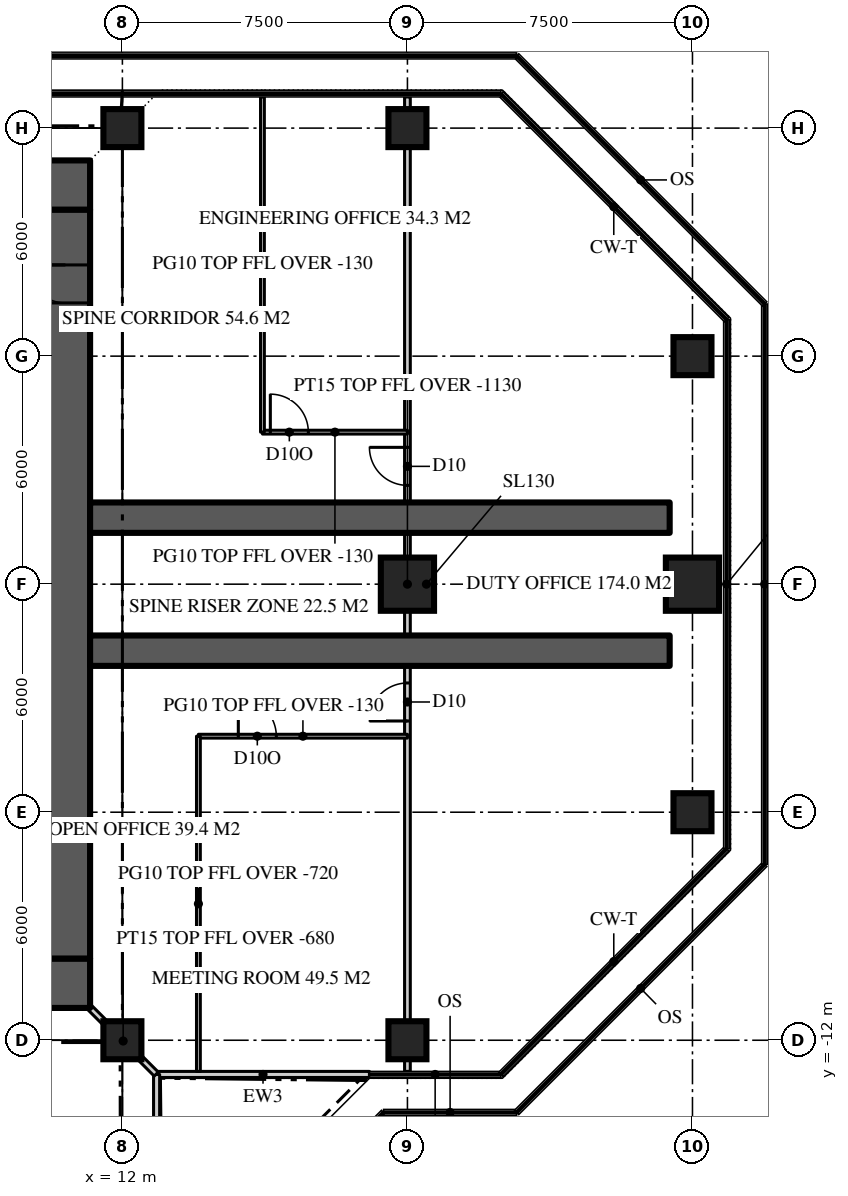
"""IFC4 building model, lengths in metres.
Left out: names, types, materials, properties, quantities, classifications, styles, units other than length and angle.
Written with IfcOpenShell. Run it as: python <this file> out.ifc"""

import sys

from ifc_helpers import new_model, si_unit, direction, frame, frame_2d, origin, origin_2d, place, context, subcontext, project, spatial, rectangle, extrude, element, fill, save


model = new_model("IFC4")
c1 = context("Model", 3, precision=1e-05, world=origin(), true_north=direction((0.0, 1.0)))
c2 = subcontext(c1, "Body", "Model", "MODEL_VIEW")
j1 = project(units=[si_unit("LENGTHUNIT", "METRE"), si_unit("PLANEANGLEUNIT", "RADIAN")], contexts=[c1])
p1 = place(None, origin())
s1 = spatial("IfcSite", under=j1, at=p1, CompositionType="ELEMENT")
p2 = place(p1, origin())
s2 = spatial("IfcBuilding", under=s1, at=p2, CompositionType="ELEMENT")
p3 = place(p2, frame((0.0, 0.0, 271.2)))
s3 = spatial("IfcBuildingStorey", under=s2, at=p3, CompositionType="ELEMENT", Elevation=271.2)
p4 = place(p3, frame((-11.15, 10.5, 0.0), z_axis=(0.0, 0.0, 1.0), x_axis=(1.0, 0.0, 0.0)))
e1 = element("IfcWall", 1, at=p4, inside=s3, PredefinedType="SHEAR", context=c2, shape_type="SweptSolid", body=[
    extrude(rectangle(XDim=22.3, YDim=1.3, at=frame_2d((11.15, 0.0))), origin(), (0.0, 0.0, 1.0), 3.9),
])
p5 = place(p4, frame((4.25, 0.0, 0.0)))
e2 = element("IfcOpeningElement", 2, at=p5, cuts=e1, PredefinedType="OPENING", context=c2, shape_type="SweptSolid", body=[
    extrude(rectangle(XDim=1.8, YDim=2.2, at=frame_2d((0.9, 1.1))), frame((0.0, 0.66, 0.0), z_axis=(0.0, -1.0, 0.0), x_axis=(1.0, 0.0, 0.0)), (0.0, 0.0, 1.0), 1.32),
])
p6 = place(p4, frame((16.25, 0.0, 0.0)))
e3 = element("IfcOpeningElement", 3, at=p6, cuts=e1, PredefinedType="OPENING", context=c2, shape_type="SweptSolid", body=[
    extrude(rectangle(XDim=1.8, YDim=2.2, at=frame_2d((0.9, 1.1))), frame((0.0, 0.66, 0.0), z_axis=(0.0, -1.0, 0.0), x_axis=(1.0, 0.0, 0.0)), (0.0, 0.0, 1.0), 1.32),
])
p7 = place(p3, frame((11.15, -10.5, 0.0), z_axis=(0.0, 0.0, 1.0), x_axis=(-1.0, 0.0, 0.0)))
e4 = element("IfcWall", 4, at=p7, inside=s3, PredefinedType="SHEAR", context=c2, shape_type="SweptSolid", body=[
    extrude(rectangle(XDim=22.3, YDim=1.3, at=frame_2d((11.15, 0.0))), origin(), (0.0, 0.0, 1.0), 3.9),
])
p8 = place(p7, frame((16.25, 0.0, 0.0)))
e5 = element("IfcOpeningElement", 5, at=p8, cuts=e4, PredefinedType="OPENING", context=c2, shape_type="SweptSolid", body=[
    extrude(rectangle(XDim=1.8, YDim=2.2, at=frame_2d((0.9, 1.1))), frame((0.0, 0.66, 0.0), z_axis=(0.0, -1.0, 0.0), x_axis=(1.0, 0.0, 0.0)), (0.0, 0.0, 1.0), 1.32),
])
p9 = place(p7, frame((4.25, 0.0, 0.0)))
e6 = element("IfcOpeningElement", 6, at=p9, cuts=e4, PredefinedType="OPENING", context=c2, shape_type="SweptSolid", body=[
    extrude(rectangle(XDim=1.8, YDim=2.2, at=frame_2d((0.9, 1.1))), frame((0.0, 0.66, 0.0), z_axis=(0.0, -1.0, 0.0), x_axis=(1.0, 0.0, 0.0)), (0.0, 0.0, 1.0), 1.32),
])
p10 = place(p3, frame((10.5, -9.85, 0.0), z_axis=(0.0, 0.0, 1.0), x_axis=(0.0, 1.0, 0.0)))
e7 = element("IfcWall", 7, at=p10, inside=s3, PredefinedType="SHEAR", context=c2, shape_type="SweptSolid", body=[
    extrude(rectangle(XDim=19.7, YDim=1.3, at=frame_2d((9.85, 0.0))), origin(), (0.0, 0.0, 1.0), 3.9),
])
p11 = place(p10, frame((17.25, 0.0, 0.0)))
e8 = element("IfcOpeningElement", 8, at=p11, cuts=e7, PredefinedType="OPENING", context=c2, shape_type="SweptSolid", body=[
    extrude(rectangle(XDim=1.0, YDim=2.2, at=frame_2d((0.5, 1.1))), frame((0.0, 0.66, 0.0), z_axis=(0.0, -1.0, 0.0), x_axis=(1.0, 0.0, 0.0)), (0.0, 0.0, 1.0), 1.32),
])
for number, where, z_axis, x_axis in (
    (9, (11.15, -1.75, 0.0), (0.0, 0.0, 1.0), (1.0, 0.0, 0.0)),
    (10, (11.15, 1.75, 0.0), (0.0, 0.0, 1.0), (1.0, 0.0, 0.0)),
):
    element("IfcWall", number, at=place(p3, frame(where, z_axis=z_axis, x_axis=x_axis)), inside=s3, PredefinedType="SHEAR", context=c2, shape_type="SweptSolid", body=[
        extrude(rectangle(XDim=15.25, YDim=0.8, at=frame_2d((7.625, 0.0))), origin(), (0.0, 0.0, 1.0), 3.9),
    ])
for number, where, z_axis, x_axis in (
    (11, (12.0, -12.0, 0.0), (0.0, 0.0, 1.0), (1.0, 0.0, 0.0)),
    (12, (19.5, -12.0, 0.0), (0.0, 0.0, 1.0), (1.0, 0.0, 0.0)),
    (13, (27.0, -6.0, 0.0), (0.0, 0.0, 1.0), (1.0, 0.0, 0.0)),
):
    element("IfcColumn", number, at=place(p3, frame(where, z_axis=z_axis, x_axis=x_axis)), inside=s3, PredefinedType="COLUMN", context=c2, shape_type="SweptSolid", body=[
        extrude(rectangle(XDim=1.0, YDim=1.0, at=origin_2d()), origin(), (0.0, 0.0, 1.0), 3.9),
    ])
for number, where, z_axis, x_axis in (
    (14, (19.5, 0.0, 0.0), (0.0, 0.0, 1.0), (1.0, 0.0, 0.0)),
    (15, (27.0, 0.0, 0.0), (0.0, 0.0, 1.0), (1.0, 0.0, 0.0)),
):
    element("IfcColumn", number, at=place(p3, frame(where, z_axis=z_axis, x_axis=x_axis)), inside=s3, PredefinedType="COLUMN", context=c2, shape_type="SweptSolid", body=[
        extrude(rectangle(XDim=1.4, YDim=1.4, at=origin_2d()), origin(), (0.0, 0.0, 1.0), 3.9),
    ])
for number, where, z_axis, x_axis in (
    (16, (27.0, 6.0, 0.0), (0.0, 0.0, 1.0), (1.0, 0.0, 0.0)),
    (17, (12.0, 12.0, 0.0), (0.0, 0.0, 1.0), (1.0, 0.0, 0.0)),
    (18, (19.5, 12.0, 0.0), (0.0, 0.0, 1.0), (1.0, 0.0, 0.0)),
):
    element("IfcColumn", number, at=place(p3, frame(where, z_axis=z_axis, x_axis=x_axis)), inside=s3, PredefinedType="COLUMN", context=c2, shape_type="SweptSolid", body=[
        extrude(rectangle(XDim=1.0, YDim=1.0, at=origin_2d()), origin(), (0.0, 0.0, 1.0), 3.9),
    ])
p12 = place(p3, frame((12.9, -12.9, 0.0), z_axis=(0.0, 0.0, 1.0), x_axis=(1.0, 0.0, 0.0)))
e19 = element("IfcWall", 19, at=p12, inside=s3, PredefinedType="SOLIDWALL", context=c2, shape_type="SweptSolid", body=[
    extrude(rectangle(XDim=5.6, YDim=0.16, at=frame_2d((2.8, 0.0))), origin(), (0.0, 0.0, 1.0), 3.77),
])
p13 = place(p3, frame((12.9, -18.5, 0.0), z_axis=(0.0, 0.0, 1.0), x_axis=(0.0, 1.0, 0.0)))
e20 = element("IfcWall", 20, at=p13, inside=s3, PredefinedType="SOLIDWALL", context=c2, shape_type="SweptSolid", body=[
    extrude(rectangle(XDim=5.6, YDim=0.16, at=frame_2d((2.8, 0.0))), origin(), (0.0, 0.0, 1.0), 3.77),
])
p14 = place(p13, frame((2.3, 0.0, 0.0)))
e21 = element("IfcOpeningElement", 21, at=p14, cuts=e20, PredefinedType="OPENING", context=c2, shape_type="SweptSolid", body=[
    extrude(rectangle(XDim=1.0, YDim=2.2, at=frame_2d((0.5, 1.1))), frame((0.0, 0.09, 0.0), z_axis=(0.0, -1.0, 0.0), x_axis=(1.0, 0.0, 0.0)), (0.0, 0.0, 1.0), 0.18),
])
p15 = place(p3, frame((19.5, -12.82, 0.0), z_axis=(0.0, 0.0, 1.0), x_axis=(0.0, 1.0, 0.0)))
e22 = element("IfcWall", 22, at=p15, inside=s3, PredefinedType="PARTITIONING", context=c2, shape_type="SweptSolid", body=[
    extrude(rectangle(XDim=25.64, YDim=0.15, at=frame_2d((12.82, 0.0))), origin(), (0.0, 0.0, 1.0), 2.77),
])
p16 = place(p15, frame((15.42, 0.0, 0.0)))
e23 = element("IfcOpeningElement", 23, at=p16, cuts=e22, PredefinedType="OPENING", context=c2, shape_type="SweptSolid", body=[
    extrude(rectangle(XDim=1.0, YDim=2.2, at=frame_2d((0.5, 1.1))), frame((0.0, 0.085, 0.0), z_axis=(0.0, -1.0, 0.0), x_axis=(1.0, 0.0, 0.0)), (0.0, 0.0, 1.0), 0.17),
])
p17 = place(p15, frame((9.22, 0.0, 0.0)))
e24 = element("IfcOpeningElement", 24, at=p17, cuts=e22, PredefinedType="OPENING", context=c2, shape_type="SweptSolid", body=[
    extrude(rectangle(XDim=1.0, YDim=2.2, at=frame_2d((0.5, 1.1))), frame((0.0, 0.085, 0.0), z_axis=(0.0, -1.0, 0.0), x_axis=(1.0, 0.0, 0.0)), (0.0, 0.0, 1.0), 0.17),
])
p18 = place(p3, frame((15.685, 4.0, 0.0), z_axis=(0.0, 0.0, 1.0), x_axis=(1.0, 0.0, 0.0)))
e25 = element("IfcWall", 25, at=p18, inside=s3, PredefinedType="PARTITIONING", context=c2, shape_type="SweptSolid", body=[
    extrude(rectangle(XDim=3.815, YDim=0.1, at=frame_2d((1.907, 0.0))), origin(), (0.0, 0.0, 1.0), 3.77),
])
p19 = place(p18, frame((0.208, 0.0, 0.0)))
e26 = element("IfcOpeningElement", 26, at=p19, cuts=e25, PredefinedType="OPENING", context=c2, shape_type="SweptSolid", body=[
    extrude(rectangle(XDim=1.0, YDim=2.2, at=frame_2d((0.5, 1.1))), frame((0.0, 0.06, 0.0), z_axis=(0.0, -1.0, 0.0), x_axis=(1.0, 0.0, 0.0)), (0.0, 0.0, 1.0), 0.12),
])
p20 = place(p3, frame((15.685, 4.0, 0.0), z_axis=(0.0, 0.0, 1.0), x_axis=(0.0, 1.0, 0.0)))
e27 = element("IfcWall", 27, at=p20, inside=s3, PredefinedType="PARTITIONING", context=c2, shape_type="SweptSolid", body=[
    extrude(rectangle(XDim=8.82, YDim=0.1, at=frame_2d((4.41, 0.0))), origin(), (0.0, 0.0, 1.0), 3.77),
])
p21 = place(p3, frame((14.0, -4.0, 0.0), z_axis=(0.0, 0.0, 1.0), x_axis=(1.0, 0.0, 0.0)))
e28 = element("IfcWall", 28, at=p21, inside=s3, PredefinedType="PARTITIONING", context=c2, shape_type="SweptSolid", body=[
    extrude(rectangle(XDim=5.5, YDim=0.1, at=frame_2d((2.75, 0.0))), origin(), (0.0, 0.0, 1.0), 3.77),
])
p22 = place(p21, frame((1.05, 0.0, 0.0)))
e29 = element("IfcOpeningElement", 29, at=p22, cuts=e28, PredefinedType="OPENING", context=c2, shape_type="SweptSolid", body=[
    extrude(rectangle(XDim=1.0, YDim=2.2, at=frame_2d((0.5, 1.1))), frame((0.0, 0.06, 0.0), z_axis=(0.0, -1.0, 0.0), x_axis=(1.0, 0.0, 0.0)), (0.0, 0.0, 1.0), 0.12),
])
p23 = place(p3, frame((14.0, -4.0, 0.0), z_axis=(0.0, 0.0, 1.0), x_axis=(0.0, -1.0, 0.0)))
e30 = element("IfcWall", 30, at=p23, inside=s3, PredefinedType="PARTITIONING", context=c2, shape_type="SweptSolid", body=[
    extrude(rectangle(XDim=8.82, YDim=0.1, at=frame_2d((4.41, 0.0))), origin(), (0.0, 0.0, 1.0), 3.18),
])
p24 = place(p3, frame((11.15, -11.15, 0.0), z_axis=(0.0, 0.0, 1.0), x_axis=(0.707106781187, -0.707106781187, 0.0)))
e31 = element("IfcWall", 31, at=p24, inside=s3, PredefinedType="PARTITIONING", context=c2, shape_type="SweptSolid", body=[
    extrude(rectangle(XDim=2.461, YDim=0.15, at=frame_2d((1.23, 0.0))), origin(), (0.0, 0.0, 1.0), 3.22),
])
p25 = place(p11, origin())
e32 = element("IfcDoor", 32, at=p25, inside=s3, OperationType="SINGLE_SWING_RIGHT", PredefinedType="DOOR", context=c2, shape_type="SweptSolid", body=[
    extrude(rectangle(XDim=1.0, YDim=2.2, at=frame_2d((0.5, 1.1))), frame((0.0, 0.025, 0.0), z_axis=(0.0, -1.0, 0.0), x_axis=(1.0, 0.0, 0.0)), (0.0, 0.0, 1.0), 0.05),
])
fill(e8, e32)
p26 = place(p16, origin())
e33 = element("IfcDoor", 33, at=p26, inside=s3, OperationType="SINGLE_SWING_RIGHT", PredefinedType="DOOR", context=c2, shape_type="SweptSolid", body=[
    extrude(rectangle(XDim=1.0, YDim=2.2, at=frame_2d((0.5, 1.1))), frame((0.0, 0.025, 0.0), z_axis=(0.0, -1.0, 0.0), x_axis=(1.0, 0.0, 0.0)), (0.0, 0.0, 1.0), 0.05),
])
fill(e23, e33)
p27 = place(p17, origin())
e34 = element("IfcDoor", 34, at=p27, inside=s3, OperationType="SINGLE_SWING_LEFT", PredefinedType="DOOR", context=c2, shape_type="SweptSolid", body=[
    extrude(rectangle(XDim=1.0, YDim=2.2, at=frame_2d((0.5, 1.1))), frame((0.0, 0.025, 0.0), z_axis=(0.0, -1.0, 0.0), x_axis=(1.0, 0.0, 0.0)), (0.0, 0.0, 1.0), 0.05),
])
fill(e24, e34)
p28 = place(p19, origin())
e35 = element("IfcDoor", 35, at=p28, inside=s3, OperationType="SINGLE_SWING_LEFT", PredefinedType="DOOR", context=c2, shape_type="SweptSolid", body=[
    extrude(rectangle(XDim=1.0, YDim=2.2, at=frame_2d((0.5, 1.1))), frame((0.0, 0.025, 0.0), z_axis=(0.0, -1.0, 0.0), x_axis=(1.0, 0.0, 0.0)), (0.0, 0.0, 1.0), 0.05),
])
fill(e26, e35)
p29 = place(p22, origin())
e36 = element("IfcDoor", 36, at=p29, inside=s3, OperationType="SINGLE_SWING_LEFT", PredefinedType="DOOR", context=c2, shape_type="SweptSolid", body=[
    extrude(rectangle(XDim=1.0, YDim=2.2, at=frame_2d((0.5, 1.1))), frame((0.0, 0.025, 0.0), z_axis=(0.0, -1.0, 0.0), x_axis=(1.0, 0.0, 0.0)), (0.0, 0.0, 1.0), 0.05),
])
fill(e29, e36)
save(model, sys.argv[1])
